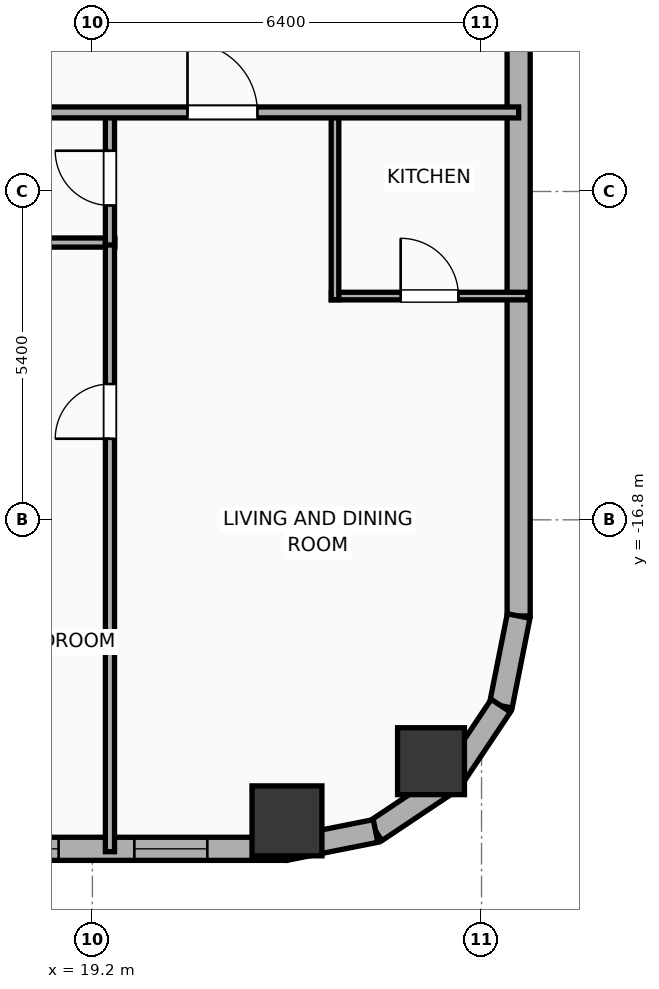
"""IFC4 building model, lengths in metres.
Left out: names, types, materials, properties, quantities, classifications, styles, units other than length and angle.
Written with IfcOpenShell. Run it as: python <this file> out.ifc"""

import sys

from ifc_helpers import new_model, si_unit, direction, frame, frame_2d, origin, origin_2d, place, context, subcontext, project, spatial, rectangle, hollow_rectangle, hollow_circle, extrude, element, fill, save


model = new_model("IFC4")
c1 = context("Model", 3, precision=1e-05, world=origin(), true_north=direction((0.0, 1.0)))
c2 = subcontext(c1, "Body", "Model", "MODEL_VIEW")
j1 = project(units=[si_unit("LENGTHUNIT", "METRE"), si_unit("PLANEANGLEUNIT", "RADIAN")], contexts=[c1])
p1 = place(None, origin())
s1 = spatial("IfcSite", under=j1, at=p1, CompositionType="ELEMENT")
p2 = place(p1, origin())
s2 = spatial("IfcBuilding", under=s1, at=p2, CompositionType="ELEMENT")
p3 = place(p2, frame((0.0, 0.0, 45.5)))
s3 = spatial("IfcBuildingStorey", under=s2, at=p3, CompositionType="ELEMENT", Elevation=45.5)
p4 = place(p3, frame((22.4, -21.75, 0.0), z_axis=(0.0, 0.0, 1.0), x_axis=(1.0, 0.0, 0.0)))
e1 = element("IfcColumn", 1, at=p4, inside=s3, PredefinedType="COLUMN", context=c2, shape_type="SweptSolid", body=[
    extrude(hollow_rectangle(XDim=1.15, YDim=1.15, WallThickness=0.04, at=origin_2d()), origin(), (0.0, 0.0, 1.0), 3.9),
])
p5 = place(p3, frame((24.769, -20.769, 0.0), z_axis=(0.0, 0.0, 1.0), x_axis=(1.0, 0.0, 0.0)))
e2 = element("IfcColumn", 2, at=p5, inside=s3, PredefinedType="COLUMN", context=c2, shape_type="SweptSolid", body=[
    extrude(hollow_circle(Radius=0.55, WallThickness=0.036, at=origin_2d()), origin(), (0.0, 0.0, 1.0), 3.9),
])
p6 = place(p3, frame((22.381, -22.21, 0.0), z_axis=(0.0, 0.0, 1.0), x_axis=(-1.0, 0.0, 0.0)))
e3 = element("IfcWall", 3, at=p6, inside=s3, PredefinedType="ELEMENTEDWALL", context=c2, shape_type="SweptSolid", body=[
    extrude(rectangle(XDim=51.963, YDim=0.38, at=frame_2d((25.981, 0.0))), origin(), (0.0, 0.0, 1.0), 3.65),
])
p7 = place(p6, frame((42.952, 0.0, 0.75)))
e4 = element("IfcOpeningElement", 4, at=p7, cuts=e3, PredefinedType="OPENING", context=c2, shape_type="SweptSolid", body=[
    extrude(rectangle(XDim=2.4, YDim=2.1, at=frame_2d((1.2, 1.05))), frame((0.0, 0.2, 0.0), z_axis=(0.0, -1.0, 0.0), x_axis=(1.0, 0.0, 0.0)), (0.0, 0.0, 1.0), 0.4),
])
p8 = place(p6, frame((49.847, 0.0, 0.75)))
e5 = element("IfcOpeningElement", 5, at=p8, cuts=e3, PredefinedType="OPENING", context=c2, shape_type="SweptSolid", body=[
    extrude(rectangle(XDim=1.2, YDim=2.05, at=frame_2d((0.6, 1.025))), frame((0.0, 0.2, 0.0), z_axis=(0.0, -1.0, 0.0), x_axis=(1.0, 0.0, 0.0)), (0.0, 0.0, 1.0), 0.4),
])
p9 = place(p6, frame((47.445, 0.0, 0.75)))
e6 = element("IfcOpeningElement", 6, at=p9, cuts=e3, PredefinedType="OPENING", context=c2, shape_type="SweptSolid", body=[
    extrude(rectangle(XDim=1.2, YDim=2.05, at=frame_2d((0.6, 1.025))), frame((0.0, 0.2, 0.0), z_axis=(0.0, -1.0, 0.0), x_axis=(1.0, 0.0, 0.0)), (0.0, 0.0, 1.0), 0.4),
])
p10 = place(p6, frame((39.526, 0.0, 0.75)))
e7 = element("IfcOpeningElement", 7, at=p10, cuts=e3, PredefinedType="OPENING", context=c2, shape_type="SweptSolid", body=[
    extrude(rectangle(XDim=1.2, YDim=2.05, at=frame_2d((0.6, 1.025))), frame((0.0, 0.2, 0.0), z_axis=(0.0, -1.0, 0.0), x_axis=(1.0, 0.0, 0.0)), (0.0, 0.0, 1.0), 0.4),
])
p11 = place(p6, frame((33.018, 0.0, 0.75)))
e8 = element("IfcOpeningElement", 8, at=p11, cuts=e3, PredefinedType="OPENING", context=c2, shape_type="SweptSolid", body=[
    extrude(rectangle(XDim=1.2, YDim=2.05, at=frame_2d((0.6, 1.025))), frame((0.0, 0.2, 0.0), z_axis=(0.0, -1.0, 0.0), x_axis=(1.0, 0.0, 0.0)), (0.0, 0.0, 1.0), 0.4),
])
p12 = place(p6, frame((36.813, 0.0, 0.75)))
e9 = element("IfcOpeningElement", 9, at=p12, cuts=e3, PredefinedType="OPENING", context=c2, shape_type="SweptSolid", body=[
    extrude(rectangle(XDim=1.2, YDim=2.05, at=frame_2d((0.6, 1.025))), frame((0.0, 0.2, 0.0), z_axis=(0.0, -1.0, 0.0), x_axis=(1.0, 0.0, 0.0)), (0.0, 0.0, 1.0), 0.4),
])
p13 = place(p6, frame((28.886, 0.0, 0.75)))
e10 = element("IfcOpeningElement", 10, at=p13, cuts=e3, PredefinedType="OPENING", context=c2, shape_type="SweptSolid", body=[
    extrude(rectangle(XDim=1.2, YDim=2.05, at=frame_2d((0.6, 1.025))), frame((0.0, 0.2, 0.0), z_axis=(0.0, -1.0, 0.0), x_axis=(1.0, 0.0, 0.0)), (0.0, 0.0, 1.0), 0.4),
])
p14 = place(p6, frame((23.306, 0.0, 0.75)))
e11 = element("IfcOpeningElement", 11, at=p14, cuts=e3, PredefinedType="OPENING", context=c2, shape_type="SweptSolid", body=[
    extrude(rectangle(XDim=1.2, YDim=2.05, at=frame_2d((0.6, 1.025))), frame((0.0, 0.2, 0.0), z_axis=(0.0, -1.0, 0.0), x_axis=(1.0, 0.0, 0.0)), (0.0, 0.0, 1.0), 0.4),
])
p15 = place(p6, frame((26.056, 0.0, 0.75)))
e12 = element("IfcOpeningElement", 12, at=p15, cuts=e3, PredefinedType="OPENING", context=c2, shape_type="SweptSolid", body=[
    extrude(rectangle(XDim=1.2, YDim=2.05, at=frame_2d((0.6, 1.025))), frame((0.0, 0.2, 0.0), z_axis=(0.0, -1.0, 0.0), x_axis=(1.0, 0.0, 0.0)), (0.0, 0.0, 1.0), 0.4),
])
p16 = place(p6, frame((18.811, 0.0, 0.75)))
e13 = element("IfcOpeningElement", 13, at=p16, cuts=e3, PredefinedType="OPENING", context=c2, shape_type="SweptSolid", body=[
    extrude(rectangle(XDim=1.2, YDim=2.05, at=frame_2d((0.6, 1.025))), frame((0.0, 0.2, 0.0), z_axis=(0.0, -1.0, 0.0), x_axis=(1.0, 0.0, 0.0)), (0.0, 0.0, 1.0), 0.4),
])
p17 = place(p6, frame((14.602, 0.0, 0.75)))
e14 = element("IfcOpeningElement", 14, at=p17, cuts=e3, PredefinedType="OPENING", context=c2, shape_type="SweptSolid", body=[
    extrude(rectangle(XDim=1.2, YDim=2.05, at=frame_2d((0.6, 1.025))), frame((0.0, 0.2, 0.0), z_axis=(0.0, -1.0, 0.0), x_axis=(1.0, 0.0, 0.0)), (0.0, 0.0, 1.0), 0.4),
])
p18 = place(p6, frame((11.852, 0.0, 0.75)))
e15 = element("IfcOpeningElement", 15, at=p18, cuts=e3, PredefinedType="OPENING", context=c2, shape_type="SweptSolid", body=[
    extrude(rectangle(XDim=1.2, YDim=2.05, at=frame_2d((0.6, 1.025))), frame((0.0, 0.2, 0.0), z_axis=(0.0, -1.0, 0.0), x_axis=(1.0, 0.0, 0.0)), (0.0, 0.0, 1.0), 0.4),
])
p19 = place(p6, frame((8.316, 0.0, 0.75)))
e16 = element("IfcOpeningElement", 16, at=p19, cuts=e3, PredefinedType="OPENING", context=c2, shape_type="SweptSolid", body=[
    extrude(rectangle(XDim=1.2, YDim=2.05, at=frame_2d((0.6, 1.025))), frame((0.0, 0.2, 0.0), z_axis=(0.0, -1.0, 0.0), x_axis=(1.0, 0.0, 0.0)), (0.0, 0.0, 1.0), 0.4),
])
p20 = place(p6, frame((6.286, 0.0, 0.75)))
e17 = element("IfcOpeningElement", 17, at=p20, cuts=e3, PredefinedType="OPENING", context=c2, shape_type="SweptSolid", body=[
    extrude(rectangle(XDim=1.2, YDim=2.05, at=frame_2d((0.6, 1.025))), frame((0.0, 0.2, 0.0), z_axis=(0.0, -1.0, 0.0), x_axis=(1.0, 0.0, 0.0)), (0.0, 0.0, 1.0), 0.4),
])
p21 = place(p6, frame((3.737, 0.0, 0.75)))
e18 = element("IfcOpeningElement", 18, at=p21, cuts=e3, PredefinedType="OPENING", context=c2, shape_type="SweptSolid", body=[
    extrude(rectangle(XDim=1.2, YDim=2.05, at=frame_2d((0.6, 1.025))), frame((0.0, 0.2, 0.0), z_axis=(0.0, -1.0, 0.0), x_axis=(1.0, 0.0, 0.0)), (0.0, 0.0, 1.0), 0.4),
])
p22 = place(p6, frame((1.291, 0.0, 0.75)))
e19 = element("IfcOpeningElement", 19, at=p22, cuts=e3, PredefinedType="OPENING", context=c2, shape_type="SweptSolid", body=[
    extrude(rectangle(XDim=1.2, YDim=2.05, at=frame_2d((0.6, 1.025))), frame((0.0, 0.2, 0.0), z_axis=(0.0, -1.0, 0.0), x_axis=(1.0, 0.0, 0.0)), (0.0, 0.0, 1.0), 0.4),
])
p23 = place(p3, frame((26.21, 18.381, 0.0), z_axis=(0.0, 0.0, 1.0), x_axis=(0.0, -1.0, 0.0)))
e20 = element("IfcWall", 20, at=p23, inside=s3, PredefinedType="ELEMENTEDWALL", context=c2, shape_type="SweptSolid", body=[
    extrude(rectangle(XDim=36.763, YDim=0.38, at=frame_2d((18.381, 0.0))), origin(), (0.0, 0.0, 1.0), 3.65),
])
p24 = place(p3, frame((26.21, -18.381, 0.0), z_axis=(0.0, 0.0, 1.0), x_axis=(-0.195086038585, -0.980786132421, 0.0)))
e21 = element("IfcWall", 21, at=p24, inside=s3, PredefinedType="ELEMENTEDWALL", context=c2, shape_type="SweptSolid", body=[
    extrude(rectangle(XDim=1.504, YDim=0.38, at=frame_2d((0.752, 0.0))), origin(), (0.0, 0.0, 1.0), 3.65),
])
for number, where, z_axis, x_axis in (
    (22, (25.917, -19.857, 0.0), (0.0, 0.0, 1.0), (-0.556, -0.831, 0.0)),
    (23, (25.091, -21.091, 0.0), (0.0, 0.0, 1.0), (-0.831, -0.556, 0.0)),
):
    element("IfcWall", number, at=place(p3, frame(where, z_axis=z_axis, x_axis=x_axis)), inside=s3, PredefinedType="ELEMENTEDWALL", context=c2, shape_type="SweptSolid", body=[
        extrude(rectangle(XDim=1.485, YDim=0.38, at=frame_2d((0.743, 0.0))), origin(), (0.0, 0.0, 1.0), 3.65),
    ])
p25 = place(p3, frame((23.857, -21.917, 0.0), z_axis=(0.0, 0.0, 1.0), x_axis=(-0.980786132421, -0.195086038585, 0.0)))
e24 = element("IfcWall", 24, at=p25, inside=s3, PredefinedType="ELEMENTEDWALL", context=c2, shape_type="SweptSolid", body=[
    extrude(rectangle(XDim=1.504, YDim=0.38, at=frame_2d((0.752, 0.0))), origin(), (0.0, 0.0, 1.0), 3.65),
])
p26 = place(p3, frame((16.34, -12.24, 0.0), z_axis=(0.0, 0.0, 1.0), x_axis=(1.0, 0.0, 0.0)))
e25 = element("IfcWall", 25, at=p26, inside=s3, PredefinedType="PLUMBINGWALL", context=c2, shape_type="SweptSolid", body=[
    extrude(rectangle(XDim=3.229, YDim=0.15, at=frame_2d((1.615, 0.0))), origin(), (0.0, 0.0, 1.0), 3.65),
])
p27 = place(p3, frame((19.489, -22.258, 0.0), z_axis=(0.0, 0.0, 1.0), x_axis=(0.0, 1.0, 0.0)))
e26 = element("IfcWall", 26, at=p27, inside=s3, PredefinedType="PLUMBINGWALL", context=c2, shape_type="SweptSolid", body=[
    extrude(rectangle(XDim=10.058, YDim=0.15, at=frame_2d((5.029, 0.0))), origin(), (0.0, 0.0, 1.0), 3.65),
])
p28 = place(p27, frame((6.792, 0.0, 0.0)))
e27 = element("IfcOpeningElement", 27, at=p28, cuts=e26, PredefinedType="OPENING", context=c2, shape_type="SweptSolid", body=[
    extrude(rectangle(XDim=0.9, YDim=2.05, at=frame_2d((0.45, 1.025))), frame((0.0, 0.085, 0.0), z_axis=(0.0, -1.0, 0.0), x_axis=(1.0, 0.0, 0.0)), (0.0, 0.0, 1.0), 0.17),
])
p29 = place(p3, frame((19.489, -12.28, 0.0), z_axis=(0.0, 0.0, 1.0), x_axis=(0.0, 1.0, 0.0)))
e28 = element("IfcWall", 28, at=p29, inside=s3, PredefinedType="PLUMBINGWALL", context=c2, shape_type="SweptSolid", body=[
    extrude(rectangle(XDim=2.2, YDim=0.15, at=frame_2d((1.1, 0.0))), origin(), (0.0, 0.0, 1.0), 3.65),
])
p30 = place(p29, frame((0.65, 0.0, 0.0)))
e29 = element("IfcOpeningElement", 29, at=p30, cuts=e28, PredefinedType="OPENING", context=c2, shape_type="SweptSolid", body=[
    extrude(rectangle(XDim=0.9, YDim=2.05, at=frame_2d((0.45, 1.025))), frame((0.0, 0.085, 0.0), z_axis=(0.0, -1.0, 0.0), x_axis=(1.0, 0.0, 0.0)), (0.0, 0.0, 1.0), 0.17),
])
p31 = place(p3, frame((23.13, -13.12, 0.0), z_axis=(0.0, 0.0, 1.0), x_axis=(1.0, 0.0, 0.0)))
e30 = element("IfcWall", 30, at=p31, inside=s3, PredefinedType="PARTITIONING", context=c2, shape_type="SweptSolid", body=[
    extrude(rectangle(XDim=3.23, YDim=0.125, at=frame_2d((1.615, 0.0))), origin(), (0.0, 0.0, 1.0), 3.65),
])
p32 = place(p31, frame((1.14, 0.0, 0.0)))
e31 = element("IfcOpeningElement", 31, at=p32, cuts=e30, PredefinedType="OPENING", context=c2, shape_type="SweptSolid", body=[
    extrude(rectangle(XDim=0.95, YDim=2.05, at=frame_2d((0.475, 1.025))), frame((0.0, 0.073, 0.0), z_axis=(0.0, -1.0, 0.0), x_axis=(1.0, 0.0, 0.0)), (0.0, 0.0, 1.0), 0.145),
])
p33 = place(p3, frame((23.19, -13.18, 0.0), z_axis=(0.0, 0.0, 1.0), x_axis=(0.0, 1.0, 0.0)))
e32 = element("IfcWall", 32, at=p33, inside=s3, PredefinedType="PARTITIONING", context=c2, shape_type="SweptSolid", body=[
    extrude(rectangle(XDim=3.1, YDim=0.125, at=frame_2d((1.55, 0.0))), origin(), (0.0, 0.0, 1.0), 3.65),
])
p34 = place(p3, frame((-33.41, -10.1, 0.0), z_axis=(0.0, 0.0, 1.0), x_axis=(1.0, 0.0, 0.0)))
e33 = element("IfcWall", 33, at=p34, inside=s3, PredefinedType="PARTITIONING", context=c2, shape_type="SweptSolid", body=[
    extrude(rectangle(XDim=59.62, YDim=0.18, at=frame_2d((29.81, 0.0))), origin(), (0.0, 0.0, 1.0), 3.65),
])
p35 = place(p34, frame((2.746, 0.0, 0.0)))
e34 = element("IfcOpeningElement", 34, at=p35, cuts=e33, PredefinedType="OPENING", context=c2, shape_type="SweptSolid", body=[
    extrude(rectangle(XDim=0.9, YDim=2.05, at=frame_2d((0.45, 1.025))), frame((0.0, 0.1, 0.0), z_axis=(0.0, -1.0, 0.0), x_axis=(1.0, 0.0, 0.0)), (0.0, 0.0, 1.0), 0.2),
])
p36 = place(p34, frame((11.552, 0.0, 0.0)))
e35 = element("IfcOpeningElement", 35, at=p36, cuts=e33, PredefinedType="OPENING", context=c2, shape_type="SweptSolid", body=[
    extrude(rectangle(XDim=1.15, YDim=2.05, at=frame_2d((0.575, 1.025))), frame((0.0, 0.1, 0.0), z_axis=(0.0, -1.0, 0.0), x_axis=(1.0, 0.0, 0.0)), (0.0, 0.0, 1.0), 0.2),
])
p37 = place(p34, frame((22.379, 0.0, 0.0)))
e36 = element("IfcOpeningElement", 36, at=p37, cuts=e33, PredefinedType="OPENING", context=c2, shape_type="SweptSolid", body=[
    extrude(rectangle(XDim=1.15, YDim=2.05, at=frame_2d((0.575, 1.025))), frame((0.0, 0.1, 0.0), z_axis=(0.0, -1.0, 0.0), x_axis=(1.0, 0.0, 0.0)), (0.0, 0.0, 1.0), 0.2),
])
p38 = place(p34, frame((31.28, 0.0, 0.0)))
e37 = element("IfcOpeningElement", 37, at=p38, cuts=e33, PredefinedType="OPENING", context=c2, shape_type="SweptSolid", body=[
    extrude(rectangle(XDim=1.15, YDim=2.05, at=frame_2d((0.575, 1.025))), frame((0.0, 0.1, 0.0), z_axis=(0.0, -1.0, 0.0), x_axis=(1.0, 0.0, 0.0)), (0.0, 0.0, 1.0), 0.2),
])
p39 = place(p34, frame((36.02, 0.0, 0.0)))
e38 = element("IfcOpeningElement", 38, at=p39, cuts=e33, PredefinedType="OPENING", context=c2, shape_type="SweptSolid", body=[
    extrude(rectangle(XDim=0.9, YDim=2.05, at=frame_2d((0.45, 1.025))), frame((0.0, 0.1, 0.0), z_axis=(0.0, -1.0, 0.0), x_axis=(1.0, 0.0, 0.0)), (0.0, 0.0, 1.0), 0.2),
])
p40 = place(p34, frame((40.044, 0.0, 0.0)))
e39 = element("IfcOpeningElement", 39, at=p40, cuts=e33, PredefinedType="OPENING", context=c2, shape_type="SweptSolid", body=[
    extrude(rectangle(XDim=1.15, YDim=2.05, at=frame_2d((0.575, 1.025))), frame((0.0, 0.1, 0.0), z_axis=(0.0, -1.0, 0.0), x_axis=(1.0, 0.0, 0.0)), (0.0, 0.0, 1.0), 0.2),
])
p41 = place(p34, frame((45.613, 0.0, 0.0)))
e40 = element("IfcOpeningElement", 40, at=p41, cuts=e33, PredefinedType="OPENING", context=c2, shape_type="SweptSolid", body=[
    extrude(rectangle(XDim=1.15, YDim=2.05, at=frame_2d((0.575, 1.025))), frame((0.0, 0.1, 0.0), z_axis=(0.0, -1.0, 0.0), x_axis=(1.0, 0.0, 0.0)), (0.0, 0.0, 1.0), 0.2),
])
p42 = place(p34, frame((54.174, 0.0, 0.0)))
e41 = element("IfcOpeningElement", 41, at=p42, cuts=e33, PredefinedType="OPENING", context=c2, shape_type="SweptSolid", body=[
    extrude(rectangle(XDim=1.15, YDim=2.05, at=frame_2d((0.575, 1.025))), frame((0.0, 0.1, 0.0), z_axis=(0.0, -1.0, 0.0), x_axis=(1.0, 0.0, 0.0)), (0.0, 0.0, 1.0), 0.2),
])
p43 = place(p21, origin())
e42 = element("IfcWindow", 42, at=p43, inside=s3, PartitioningType="SINGLE_PANEL", PredefinedType="WINDOW", context=c2, shape_type="SweptSolid", body=[
    extrude(rectangle(XDim=1.2, YDim=2.05, at=frame_2d((0.6, 1.025))), frame((0.0, 0.03, 0.0), z_axis=(0.0, -1.0, 0.0), x_axis=(1.0, 0.0, 0.0)), (0.0, 0.0, 1.0), 0.06),
])
fill(e18, e42)
p44 = place(p22, origin())
e43 = element("IfcWindow", 43, at=p44, inside=s3, PartitioningType="SINGLE_PANEL", PredefinedType="WINDOW", context=c2, shape_type="SweptSolid", body=[
    extrude(rectangle(XDim=1.2, YDim=2.05, at=frame_2d((0.6, 1.025))), frame((0.0, 0.03, 0.0), z_axis=(0.0, -1.0, 0.0), x_axis=(1.0, 0.0, 0.0)), (0.0, 0.0, 1.0), 0.06),
])
fill(e19, e43)
p45 = place(p28, origin())
e44 = element("IfcDoor", 44, at=p45, inside=s3, OperationType="SINGLE_SWING_LEFT", PredefinedType="DOOR", context=c2, shape_type="SweptSolid", body=[
    extrude(rectangle(XDim=0.9, YDim=2.05, at=frame_2d((0.45, 1.025))), frame((0.0, 0.025, 0.0), z_axis=(0.0, -1.0, 0.0), x_axis=(1.0, 0.0, 0.0)), (0.0, 0.0, 1.0), 0.05),
])
fill(e27, e44)
p46 = place(p30, origin())
e45 = element("IfcDoor", 45, at=p46, inside=s3, OperationType="SINGLE_SWING_RIGHT", PredefinedType="DOOR", context=c2, shape_type="SweptSolid", body=[
    extrude(rectangle(XDim=0.9, YDim=2.05, at=frame_2d((0.45, 1.025))), frame((0.0, 0.025, 0.0), z_axis=(0.0, -1.0, 0.0), x_axis=(1.0, 0.0, 0.0)), (0.0, 0.0, 1.0), 0.05),
])
fill(e29, e45)
p47 = place(p32, origin())
e46 = element("IfcDoor", 46, at=p47, inside=s3, OperationType="SINGLE_SWING_LEFT", PredefinedType="DOOR", context=c2, shape_type="SweptSolid", body=[
    extrude(rectangle(XDim=0.95, YDim=2.05, at=frame_2d((0.475, 1.025))), frame((0.0, 0.025, 0.0), z_axis=(0.0, -1.0, 0.0), x_axis=(1.0, 0.0, 0.0)), (0.0, 0.0, 1.0), 0.05),
])
fill(e31, e46)
p48 = place(p42, origin())
e47 = element("IfcDoor", 47, at=p48, inside=s3, OperationType="SINGLE_SWING_LEFT", PredefinedType="DOOR", context=c2, shape_type="SweptSolid", body=[
    extrude(rectangle(XDim=1.15, YDim=2.05, at=frame_2d((0.575, 1.025))), frame((0.0, 0.025, 0.0), z_axis=(0.0, -1.0, 0.0), x_axis=(1.0, 0.0, 0.0)), (0.0, 0.0, 1.0), 0.05),
])
fill(e41, e47)
save(model, sys.argv[1])
